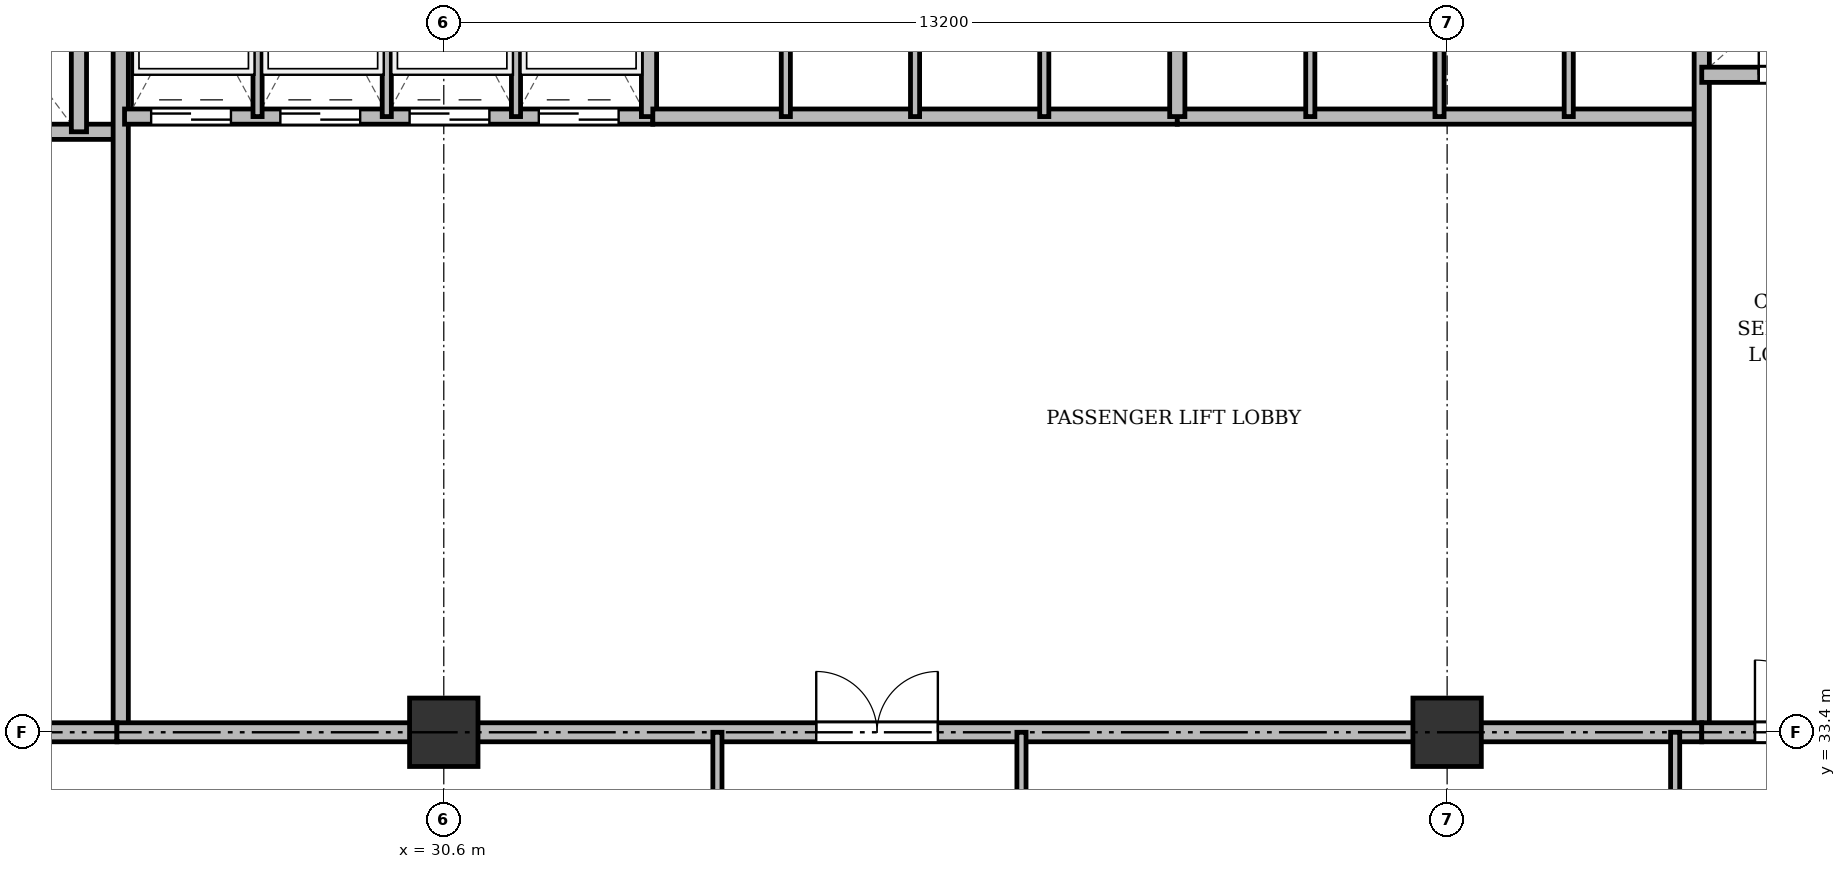
"""IFC4 building model, lengths in metres.
Left out: names, types, materials, properties, quantities, classifications, styles, units other than length and angle.
Written with IfcOpenShell. Run it as: python <this file> out.ifc"""

import sys

from ifc_helpers import new_model, si_unit, direction, frame, frame_2d, origin, origin_2d, place, context, subcontext, project, spatial, rectangle, extrude, source, transform, mapped, element, fill, save


model = new_model("IFC4")
c1 = context("Model", 3, precision=1e-05, world=origin(), true_north=direction((0.0, 1.0)))
c2 = subcontext(c1, "Body", "Model", "MODEL_VIEW")
j1 = project(units=[si_unit("LENGTHUNIT", "METRE"), si_unit("PLANEANGLEUNIT", "RADIAN")], contexts=[c1])
p1 = place(None, origin())
s1 = spatial("IfcSite", under=j1, at=p1, CompositionType="ELEMENT")
p2 = place(p1, origin())
s2 = spatial("IfcBuilding", under=s1, at=p2, CompositionType="ELEMENT")
p3 = place(p2, frame((0.0, 0.0, 34.3)))
s3 = spatial("IfcBuildingStorey", under=s2, at=p3, CompositionType="ELEMENT", Elevation=34.3)
m1 = source(origin(), c2, "Body", "SweptSolid", [
    extrude(rectangle(XDim=0.9, YDim=0.9, at=origin_2d()), origin(), (0.0, 0.0, 1.0), 3.6),
])
for number, where, z_axis, x_axis in (
    (1, (30.6, 33.4, 0.0), (0.0, 0.0, 1.0), (1.0, 0.0, 0.0)),
    (2, (43.8, 33.4, 0.0), (0.0, 0.0, 1.0), (1.0, 0.0, 0.0)),
):
    element("IfcColumn", number, at=place(p3, frame(where, z_axis=z_axis, x_axis=x_axis)), inside=s3, PredefinedType="COLUMN", context=c2, shape_type="MappedRepresentation", body=[
        mapped(m1, transform((0.0, 0.0, 0.0), x_axis=(1.0, 0.0, 0.0), y_axis=(0.0, 1.0, 0.0), z_axis=(0.0, 0.0, 1.0), scale=1.0)),
    ])
p4 = place(p3, frame((19.55, 41.3, 0.0), z_axis=(0.0, 0.0, 1.0), x_axis=(1.0, 0.0, 0.0)))
e3 = element("IfcWall", 3, at=p4, inside=s3, PredefinedType="SOLIDWALL", context=c2, shape_type="SweptSolid", body=[
    extrude(rectangle(XDim=6.75, YDim=0.2, at=frame_2d((3.375, 0.0))), origin(), (0.0, 0.0, 1.0), 3.34),
])
p5 = place(p4, frame((1.7, 0.0, 0.0)))
e4 = element("IfcOpeningElement", 4, at=p5, cuts=e3, PredefinedType="OPENING", context=c2, shape_type="SweptSolid", body=[
    extrude(rectangle(XDim=1.1, YDim=2.15, at=frame_2d((0.55, 1.075))), frame((0.0, 0.11, 0.0), z_axis=(0.0, -1.0, 0.0), x_axis=(1.0, 0.0, 0.0)), (0.0, 0.0, 1.0), 0.22),
])
p6 = place(p4, frame((4.4, 0.0, 0.0)))
e5 = element("IfcOpeningElement", 5, at=p6, cuts=e3, PredefinedType="OPENING", context=c2, shape_type="SweptSolid", body=[
    extrude(rectangle(XDim=1.1, YDim=2.15, at=frame_2d((0.55, 1.075))), frame((0.0, 0.11, 0.0), z_axis=(0.0, -1.0, 0.0), x_axis=(1.0, 0.0, 0.0)), (0.0, 0.0, 1.0), 0.22),
])
p7 = place(p3, frame((25.8, 41.3, 0.0), z_axis=(0.0, 0.0, 1.0), x_axis=(0.0, 1.0, 0.0)))
e6 = element("IfcWall", 6, at=p7, inside=s3, PredefinedType="SOLIDWALL", context=c2, shape_type="SweptSolid", body=[
    extrude(rectangle(XDim=3.4, YDim=0.2, at=frame_2d((1.7, 0.0))), origin(), (0.0, 0.0, 1.0), 3.34),
])
p8 = place(p3, frame((26.35, 33.4, 0.0), z_axis=(0.0, 0.0, 1.0), x_axis=(0.0, 1.0, 0.0)))
e7 = element("IfcWall", 7, at=p8, inside=s3, PredefinedType="SOLIDWALL", context=c2, shape_type="SweptSolid", body=[
    extrude(rectangle(XDim=11.3, YDim=0.2, at=frame_2d((5.65, 0.0))), origin(), (0.0, 0.0, 1.0), 2.69),
])
p9 = place(p3, frame((19.5, 33.4, 0.0), z_axis=(0.0, 0.0, 1.0), x_axis=(1.0, 0.0, 0.0)))
e8 = element("IfcWall", 8, at=p9, inside=s3, PredefinedType="PARTITIONING", context=c2, shape_type="SweptSolid", body=[
    extrude(rectangle(XDim=6.8, YDim=0.25, at=frame_2d((3.4, 0.0))), origin(), (0.0, 0.0, 1.0), 2.69),
])
p10 = place(p9, frame((0.75, 0.0, 0.0)))
e9 = element("IfcOpeningElement", 9, at=p10, cuts=e8, PredefinedType="OPENING", context=c2, shape_type="SweptSolid", body=[
    extrude(rectangle(XDim=1.6, YDim=2.2, at=frame_2d((0.8, 1.1))), frame((0.0, 0.135, 0.0), z_axis=(0.0, -1.0, 0.0), x_axis=(1.0, 0.0, 0.0)), (0.0, 0.0, 1.0), 0.27),
])
p11 = place(p3, frame((26.4, 41.5, 0.0), z_axis=(0.0, 0.0, 1.0), x_axis=(1.0, 0.0, 0.0)))
e10 = element("IfcWall", 10, at=p11, inside=s3, PredefinedType="SOLIDWALL", context=c2, shape_type="SweptSolid", body=[
    extrude(rectangle(XDim=6.95, YDim=0.2, at=frame_2d((3.475, 0.0))), origin(), (0.0, 0.0, 1.0), 3.34),
])
p12 = place(p11, frame((0.35, 0.0, 0.0)))
e11 = element("IfcOpeningElement", 11, at=p12, cuts=e10, PredefinedType="OPENING", context=c2, shape_type="SweptSolid", body=[
    extrude(rectangle(XDim=1.05, YDim=2.15, at=frame_2d((0.525, 1.075))), frame((0.0, 0.11, 0.0), z_axis=(0.0, -1.0, 0.0), x_axis=(1.0, 0.0, 0.0)), (0.0, 0.0, 1.0), 0.22),
])
p13 = place(p11, frame((2.05, 0.0, 0.0)))
e12 = element("IfcOpeningElement", 12, at=p13, cuts=e10, PredefinedType="OPENING", context=c2, shape_type="SweptSolid", body=[
    extrude(rectangle(XDim=1.05, YDim=2.15, at=frame_2d((0.525, 1.075))), frame((0.0, 0.11, 0.0), z_axis=(0.0, -1.0, 0.0), x_axis=(1.0, 0.0, 0.0)), (0.0, 0.0, 1.0), 0.22),
])
p14 = place(p11, frame((3.75, 0.0, 0.0)))
e13 = element("IfcOpeningElement", 13, at=p14, cuts=e10, PredefinedType="OPENING", context=c2, shape_type="SweptSolid", body=[
    extrude(rectangle(XDim=1.05, YDim=2.15, at=frame_2d((0.525, 1.075))), frame((0.0, 0.11, 0.0), z_axis=(0.0, -1.0, 0.0), x_axis=(1.0, 0.0, 0.0)), (0.0, 0.0, 1.0), 0.22),
])
p15 = place(p11, frame((5.45, 0.0, 0.0)))
e14 = element("IfcOpeningElement", 14, at=p15, cuts=e10, PredefinedType="OPENING", context=c2, shape_type="SweptSolid", body=[
    extrude(rectangle(XDim=1.05, YDim=2.15, at=frame_2d((0.525, 1.075))), frame((0.0, 0.11, 0.0), z_axis=(0.0, -1.0, 0.0), x_axis=(1.0, 0.0, 0.0)), (0.0, 0.0, 1.0), 0.22),
])
p16 = place(p3, frame((33.3, 41.5, 0.0), z_axis=(0.0, 0.0, 1.0), x_axis=(0.0, 1.0, 0.0)))
e15 = element("IfcWall", 15, at=p16, inside=s3, PredefinedType="SOLIDWALL", context=c2, shape_type="SweptSolid", body=[
    extrude(rectangle(XDim=3.2, YDim=0.2, at=frame_2d((1.6, 0.0))), origin(), (0.0, 0.0, 1.0), 3.34),
])
for number, where, z_axis, x_axis in (
    (16, (28.15, 41.5, 0.0), (0.0, 0.0, 1.0), (0.0, 1.0, 0.0)),
    (17, (29.85, 41.5, 0.0), (0.0, 0.0, 1.0), (0.0, 1.0, 0.0)),
    (18, (31.55, 41.5, 0.0), (0.0, 0.0, 1.0), (0.0, 1.0, 0.0)),
):
    element("IfcWall", number, at=place(p3, frame(where, z_axis=z_axis, x_axis=x_axis)), inside=s3, PredefinedType="PARTITIONING", context=c2, shape_type="SweptSolid", body=[
        extrude(rectangle(XDim=3.2, YDim=0.12, at=frame_2d((1.6, 0.0))), origin(), (0.0, 0.0, 1.0), 3.34),
    ])
p17 = place(p3, frame((33.35, 41.5, 0.0), z_axis=(0.0, 0.0, 1.0), x_axis=(1.0, 0.0, 0.0)))
e19 = element("IfcWall", 19, at=p17, inside=s3, PredefinedType="SOLIDWALL", context=c2, shape_type="SweptSolid", body=[
    extrude(rectangle(XDim=6.9, YDim=0.2, at=frame_2d((3.45, 0.0))), origin(), (0.0, 0.0, 1.0), 3.34),
])
for number, where, z_axis, x_axis in (
    (20, (35.1, 41.5, 0.0), (0.0, 0.0, 1.0), (0.0, 1.0, 0.0)),
    (21, (36.8, 41.5, 0.0), (0.0, 0.0, 1.0), (0.0, 1.0, 0.0)),
    (22, (38.5, 41.5, 0.0), (0.0, 0.0, 1.0), (0.0, 1.0, 0.0)),
):
    element("IfcWall", number, at=place(p3, frame(where, z_axis=z_axis, x_axis=x_axis)), inside=s3, PredefinedType="PARTITIONING", context=c2, shape_type="SweptSolid", body=[
        extrude(rectangle(XDim=3.2, YDim=0.12, at=frame_2d((1.6, 0.0))), origin(), (0.0, 0.0, 1.0), 3.34),
    ])
p18 = place(p3, frame((40.25, 41.5, 0.0), z_axis=(0.0, 0.0, 1.0), x_axis=(1.0, 0.0, 0.0)))
e23 = element("IfcWall", 23, at=p18, inside=s3, PredefinedType="SOLIDWALL", context=c2, shape_type="SweptSolid", body=[
    extrude(rectangle(XDim=6.9, YDim=0.2, at=frame_2d((3.45, 0.0))), origin(), (0.0, 0.0, 1.0), 2.752),
])
p19 = place(p3, frame((40.25, 41.5, 0.0), z_axis=(0.0, 0.0, 1.0), x_axis=(0.0, 1.0, 0.0)))
e24 = element("IfcWall", 24, at=p19, inside=s3, PredefinedType="SOLIDWALL", context=c2, shape_type="SweptSolid", body=[
    extrude(rectangle(XDim=3.2, YDim=0.2, at=frame_2d((1.6, 0.0))), origin(), (0.0, 0.0, 1.0), 3.34),
])
p20 = place(p3, frame((42.0, 41.5, 0.0), z_axis=(0.0, 0.0, 1.0), x_axis=(0.0, 1.0, 0.0)))
e25 = element("IfcWall", 25, at=p20, inside=s3, PredefinedType="PARTITIONING", context=c2, shape_type="SweptSolid", body=[
    extrude(rectangle(XDim=3.2, YDim=0.12, at=frame_2d((1.6, 0.0))), origin(), (0.0, 0.0, 1.0), 3.34),
])
p21 = place(p3, frame((43.7, 41.5, 0.0), z_axis=(0.0, 0.0, 1.0), x_axis=(0.0, 1.0, 0.0)))
e26 = element("IfcWall", 26, at=p21, inside=s3, PredefinedType="PARTITIONING", context=c2, shape_type="SweptSolid", body=[
    extrude(rectangle(XDim=3.2, YDim=0.12, at=frame_2d((1.6, 0.0))), origin(), (0.0, 0.0, 1.0), 2.752),
])
p22 = place(p3, frame((45.4, 41.5, 0.0), z_axis=(0.0, 0.0, 1.0), x_axis=(0.0, 1.0, 0.0)))
e27 = element("IfcWall", 27, at=p22, inside=s3, PredefinedType="PARTITIONING", context=c2, shape_type="SweptSolid", body=[
    extrude(rectangle(XDim=3.2, YDim=0.12, at=frame_2d((1.6, 0.0))), origin(), (0.0, 0.0, 1.0), 3.34),
])
p23 = place(p3, frame((47.15, 33.4, 0.0), z_axis=(0.0, 0.0, 1.0), x_axis=(0.0, 1.0, 0.0)))
e28 = element("IfcWall", 28, at=p23, inside=s3, PredefinedType="SOLIDWALL", context=c2, shape_type="SweptSolid", body=[
    extrude(rectangle(XDim=11.3, YDim=0.2, at=frame_2d((5.65, 0.0))), origin(), (0.0, 0.0, 1.0), 2.69),
])
p24 = place(p3, frame((26.3, 33.4, 0.0), z_axis=(0.0, 0.0, 1.0), x_axis=(1.0, 0.0, 0.0)))
e29 = element("IfcWall", 29, at=p24, inside=s3, PredefinedType="PARTITIONING", context=c2, shape_type="SweptSolid", body=[
    extrude(rectangle(XDim=20.85, YDim=0.25, at=frame_2d((10.425, 0.0))), origin(), (0.0, 0.0, 1.0), 2.69),
])
p25 = place(p24, frame((9.2, 0.0, 0.0)))
e30 = element("IfcOpeningElement", 30, at=p25, cuts=e29, PredefinedType="OPENING", context=c2, shape_type="SweptSolid", body=[
    extrude(rectangle(XDim=1.6, YDim=2.2, at=frame_2d((0.8, 1.1))), frame((0.0, 0.135, 0.0), z_axis=(0.0, -1.0, 0.0), x_axis=(1.0, 0.0, 0.0)), (0.0, 0.0, 1.0), 0.27),
])
p26 = place(p3, frame((47.15, 42.05, 0.0), z_axis=(0.0, 0.0, 1.0), x_axis=(1.0, 0.0, 0.0)))
e31 = element("IfcWall", 31, at=p26, inside=s3, PredefinedType="SOLIDWALL", context=c2, shape_type="SweptSolid", body=[
    extrude(rectangle(XDim=7.85, YDim=0.2, at=frame_2d((3.925, 0.0))), origin(), (0.0, 0.0, 1.0), 2.752),
])
p27 = place(p26, frame((0.75, 0.0, 0.0)))
e32 = element("IfcOpeningElement", 32, at=p27, cuts=e31, PredefinedType="OPENING", context=c2, shape_type="SweptSolid", body=[
    extrude(rectangle(XDim=0.9, YDim=2.1, at=frame_2d((0.45, 1.05))), frame((0.0, 0.11, 0.0), z_axis=(0.0, -1.0, 0.0), x_axis=(1.0, 0.0, 0.0)), (0.0, 0.0, 1.0), 0.22),
])
p28 = place(p26, frame((3.85, 0.0, 0.0)))
e33 = element("IfcOpeningElement", 33, at=p28, cuts=e31, PredefinedType="OPENING", context=c2, shape_type="SweptSolid", body=[
    extrude(rectangle(XDim=0.9, YDim=2.1, at=frame_2d((0.45, 1.05))), frame((0.0, 0.11, 0.0), z_axis=(0.0, -1.0, 0.0), x_axis=(1.0, 0.0, 0.0)), (0.0, 0.0, 1.0), 0.22),
])
p29 = place(p3, frame((47.15, 33.4, 0.0), z_axis=(0.0, 0.0, 1.0), x_axis=(1.0, 0.0, 0.0)))
e34 = element("IfcWall", 34, at=p29, inside=s3, PredefinedType="PARTITIONING", context=c2, shape_type="SweptSolid", body=[
    extrude(rectangle(XDim=11.15, YDim=0.25, at=frame_2d((5.575, 0.0))), origin(), (0.0, 0.0, 1.0), 2.69),
])
p30 = place(p29, frame((0.7, 0.0, 0.0)))
e35 = element("IfcOpeningElement", 35, at=p30, cuts=e34, PredefinedType="OPENING", context=c2, shape_type="SweptSolid", body=[
    extrude(rectangle(XDim=0.95, YDim=2.15, at=frame_2d((0.475, 1.075))), frame((0.0, 0.135, 0.0), z_axis=(0.0, -1.0, 0.0), x_axis=(1.0, 0.0, 0.0)), (0.0, 0.0, 1.0), 0.27),
])
p31 = place(p29, frame((6.0, 0.0, 0.0)))
e36 = element("IfcOpeningElement", 36, at=p31, cuts=e34, PredefinedType="OPENING", context=c2, shape_type="SweptSolid", body=[
    extrude(rectangle(XDim=1.2, YDim=2.15, at=frame_2d((0.6, 1.075))), frame((0.0, 0.135, 0.0), z_axis=(0.0, -1.0, 0.0), x_axis=(1.0, 0.0, 0.0)), (0.0, 0.0, 1.0), 0.27),
])
for number, where, z_axis, x_axis in (
    (37, (34.2, 29.8, 0.0), (0.0, 0.0, 1.0), (0.0, 1.0, 0.0)),
    (38, (38.2, 29.8, 0.0), (0.0, 0.0, 1.0), (0.0, 1.0, 0.0)),
    (39, (46.8, 29.8, 0.0), (0.0, 0.0, 1.0), (0.0, 1.0, 0.0)),
):
    element("IfcWall", number, at=place(p3, frame(where, z_axis=z_axis, x_axis=x_axis)), inside=s3, PredefinedType="PARTITIONING", context=c2, shape_type="SweptSolid", body=[
        extrude(rectangle(XDim=3.6, YDim=0.12, at=frame_2d((1.8, 0.0))), origin(), (0.0, 0.0, 1.0), 2.69),
    ])
m2 = source(origin(), c2, "Body", "SweptSolid", [
    extrude(rectangle(XDim=1.05, YDim=2.15, at=frame_2d((0.525, 1.075))), frame((0.0, 0.025, 0.0), z_axis=(0.0, -1.0, 0.0), x_axis=(1.0, 0.0, 0.0)), (0.0, 0.0, 1.0), 0.05),
])
p32 = place(p12, origin())
e40 = element("IfcDoor", 40, at=p32, inside=s3, OperationType="DOUBLE_DOOR_SLIDING", PredefinedType="DOOR", context=c2, shape_type="MappedRepresentation", body=[
    mapped(m2, transform((0.0, 0.0, 0.0), x_axis=(1.0, 0.0, 0.0), y_axis=(0.0, 1.0, 0.0), z_axis=(0.0, 0.0, 1.0), scale=1.0)),
])
fill(e11, e40)
p33 = place(p13, origin())
e41 = element("IfcDoor", 41, at=p33, inside=s3, OperationType="DOUBLE_DOOR_SLIDING", PredefinedType="DOOR", context=c2, shape_type="MappedRepresentation", body=[
    mapped(m2, transform((0.0, 0.0, 0.0), x_axis=(1.0, 0.0, 0.0), y_axis=(0.0, 1.0, 0.0), z_axis=(0.0, 0.0, 1.0), scale=1.0)),
])
fill(e12, e41)
p34 = place(p14, origin())
e42 = element("IfcDoor", 42, at=p34, inside=s3, OperationType="DOUBLE_DOOR_SLIDING", PredefinedType="DOOR", context=c2, shape_type="MappedRepresentation", body=[
    mapped(m2, transform((0.0, 0.0, 0.0), x_axis=(1.0, 0.0, 0.0), y_axis=(0.0, 1.0, 0.0), z_axis=(0.0, 0.0, 1.0), scale=1.0)),
])
fill(e13, e42)
p35 = place(p15, origin())
e43 = element("IfcDoor", 43, at=p35, inside=s3, OperationType="DOUBLE_DOOR_SLIDING", PredefinedType="DOOR", context=c2, shape_type="MappedRepresentation", body=[
    mapped(m2, transform((0.0, 0.0, 0.0), x_axis=(1.0, 0.0, 0.0), y_axis=(0.0, 1.0, 0.0), z_axis=(0.0, 0.0, 1.0), scale=1.0)),
])
fill(e14, e43)
m3 = source(origin(), c2, "Body", "SweptSolid", [
    extrude(rectangle(XDim=1.6, YDim=2.2, at=frame_2d((0.8, 1.1))), frame((0.0, 0.025, 0.0), z_axis=(0.0, -1.0, 0.0), x_axis=(1.0, 0.0, 0.0)), (0.0, 0.0, 1.0), 0.05),
])
p36 = place(p25, origin())
e44 = element("IfcDoor", 44, at=p36, inside=s3, OperationType="DOUBLE_DOOR_SINGLE_SWING", PredefinedType="DOOR", context=c2, shape_type="MappedRepresentation", body=[
    mapped(m3, transform((0.0, 0.0, 0.0), x_axis=(1.0, 0.0, 0.0), y_axis=(0.0, 1.0, 0.0), z_axis=(0.0, 0.0, 1.0), scale=1.0)),
])
fill(e30, e44)
m4 = source(origin(), c2, "Body", "SweptSolid", [
    extrude(rectangle(XDim=0.9, YDim=2.1, at=frame_2d((0.45, 1.05))), frame((0.0, 0.025, 0.0), z_axis=(0.0, -1.0, 0.0), x_axis=(1.0, 0.0, 0.0)), (0.0, 0.0, 1.0), 0.05),
])
p37 = place(p27, origin())
e45 = element("IfcDoor", 45, at=p37, inside=s3, OperationType="SINGLE_SWING_LEFT", PredefinedType="DOOR", context=c2, shape_type="MappedRepresentation", body=[
    mapped(m4, transform((0.0, 0.0, 0.0), x_axis=(1.0, 0.0, 0.0), y_axis=(0.0, 1.0, 0.0), z_axis=(0.0, 0.0, 1.0), scale=1.0)),
])
fill(e32, e45)
m5 = source(origin(), c2, "Body", "SweptSolid", [
    extrude(rectangle(XDim=0.95, YDim=2.15, at=frame_2d((0.475, 1.075))), frame((0.0, 0.025, 0.0), z_axis=(0.0, -1.0, 0.0), x_axis=(1.0, 0.0, 0.0)), (0.0, 0.0, 1.0), 0.05),
])
p38 = place(p30, origin())
e46 = element("IfcDoor", 46, at=p38, inside=s3, OperationType="SINGLE_SWING_LEFT", PredefinedType="DOOR", context=c2, shape_type="MappedRepresentation", body=[
    mapped(m5, transform((0.0, 0.0, 0.0), x_axis=(1.0, 0.0, 0.0), y_axis=(0.0, 1.0, 0.0), z_axis=(0.0, 0.0, 1.0), scale=1.0)),
])
fill(e35, e46)
save(model, sys.argv[1])
